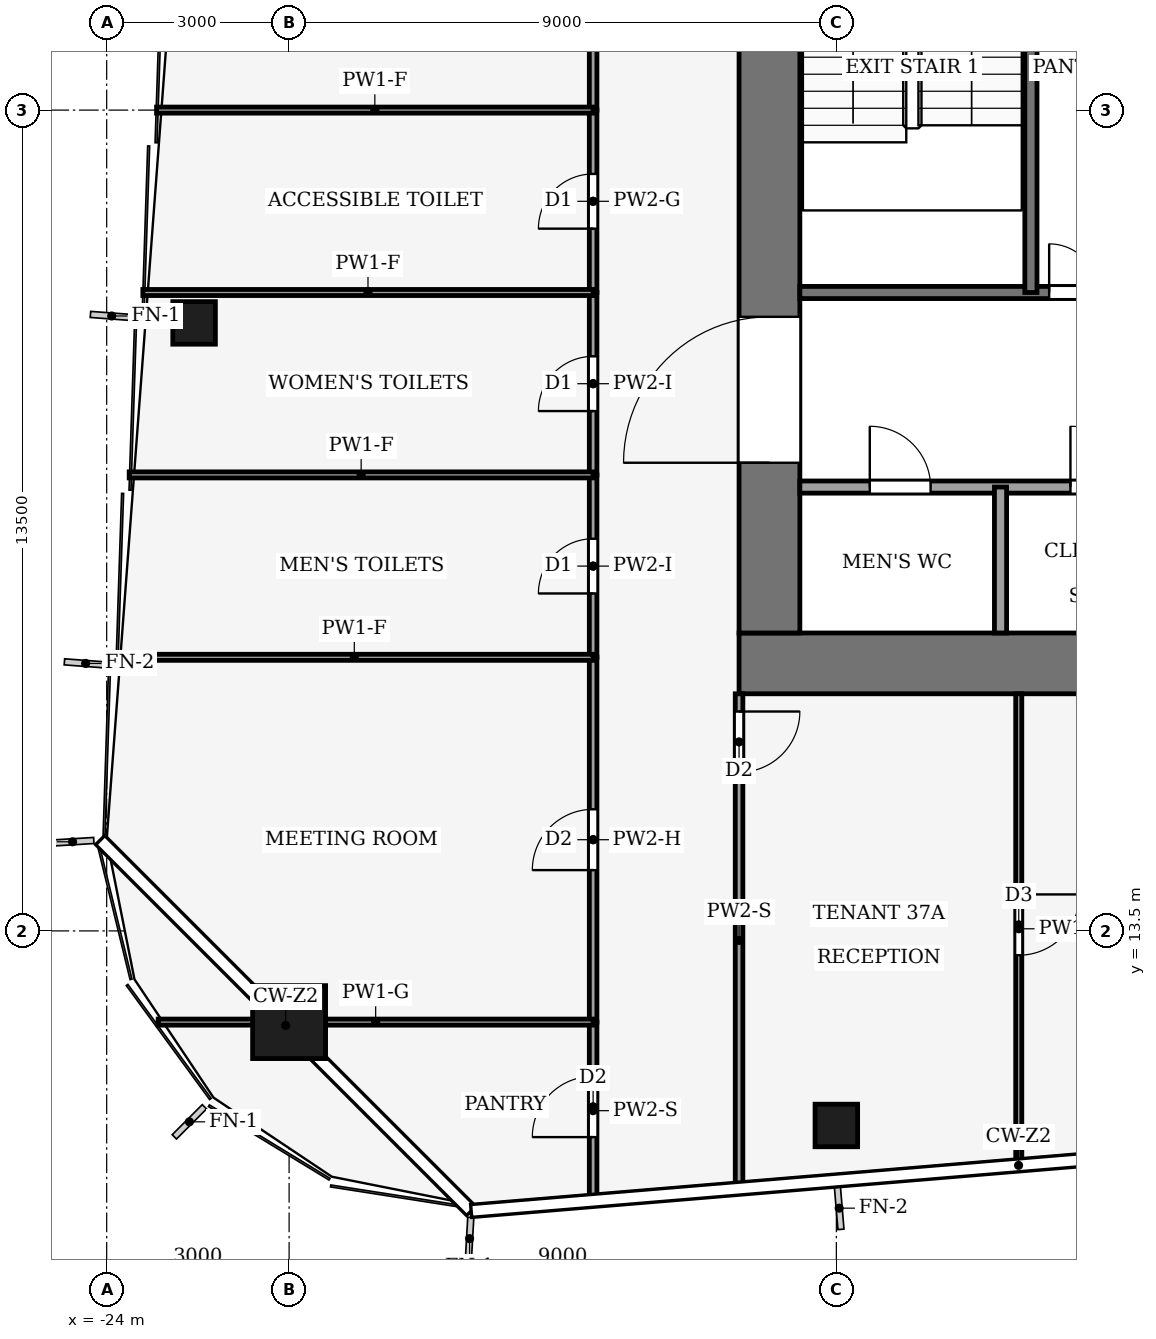
"""IFC4 building model, lengths in metres.
Left out: names, types, materials, properties, quantities, classifications, styles, units other than length and angle.
Written with IfcOpenShell. Run it as: python <this file> out.ifc"""

import sys

from ifc_helpers import new_model, si_unit, direction, frame, frame_2d, origin, origin_2d, place, context, subcontext, project, spatial, rectangle, hollow_rectangle, extrude, element, fill, save


model = new_model("IFC4")
c1 = context("Model", 3, precision=1e-05, world=origin(), true_north=direction((0.0, 1.0)))
c2 = subcontext(c1, "Body", "Model", "MODEL_VIEW")
j1 = project(units=[si_unit("LENGTHUNIT", "METRE"), si_unit("PLANEANGLEUNIT", "RADIAN")], contexts=[c1])
p1 = place(None, origin())
s1 = spatial("IfcSite", under=j1, at=p1, CompositionType="ELEMENT")
p2 = place(p1, origin())
s2 = spatial("IfcBuilding", under=s1, at=p2, CompositionType="ELEMENT")
p3 = place(p2, frame((0.0, 0.0, 162.0)))
s3 = spatial("IfcBuildingStorey", under=s2, at=p3, CompositionType="ELEMENT", Elevation=162.0)
p4 = place(p3, frame((-13.6, 17.9, -0.13), z_axis=(0.0, 0.0, 1.0), x_axis=(1.0, 0.0, 0.0)))
e1 = element("IfcWall", 1, at=p4, inside=s3, PredefinedType="SHEAR", context=c2, shape_type="SweptSolid", body=[
    extrude(rectangle(XDim=27.2, YDim=1.0, at=frame_2d((13.6, 0.0))), origin(), (0.0, 0.0, 1.0), 4.0),
])
p5 = place(p3, frame((-13.1, 18.4, -0.13), z_axis=(0.0, 0.0, 1.0), x_axis=(0.0, 1.0, 0.0)))
e2 = element("IfcWall", 2, at=p5, inside=s3, PredefinedType="SHEAR", context=c2, shape_type="SweptSolid", body=[
    extrude(rectangle(XDim=19.2, YDim=1.0, at=frame_2d((9.6, 0.0))), origin(), (0.0, 0.0, 1.0), 4.0),
])
p6 = place(p5, frame((2.8, 0.0, 0.13)))
e3 = element("IfcOpeningElement", 3, at=p6, cuts=e2, PredefinedType="OPENING", context=c2, shape_type="SweptSolid", body=[
    extrude(rectangle(XDim=2.4, YDim=2.4, at=frame_2d((1.2, 1.2))), frame((0.0, 0.51, 0.0), z_axis=(0.0, -1.0, 0.0), x_axis=(1.0, 0.0, 0.0)), (0.0, 0.0, 1.0), 1.02),
])
p7 = place(p5, frame((13.4, 0.0, 0.13)))
e4 = element("IfcOpeningElement", 4, at=p7, cuts=e2, PredefinedType="OPENING", context=c2, shape_type="SweptSolid", body=[
    extrude(rectangle(XDim=1.4, YDim=2.2, at=frame_2d((0.7, 1.1))), frame((0.0, 0.51, 0.0), z_axis=(0.0, -1.0, 0.0), x_axis=(1.0, 0.0, 0.0)), (0.0, 0.0, 1.0), 1.02),
])
p8 = place(p3, frame((-21.0, 12.0, 0.0), z_axis=(0.0, 0.0, 1.0), x_axis=(1.0, 0.0, 0.0)))
e5 = element("IfcColumn", 5, at=p8, inside=s3, PredefinedType="COLUMN", context=c2, shape_type="SweptSolid", body=[
    extrude(hollow_rectangle(XDim=1.2, YDim=1.2, WallThickness=0.07, at=origin_2d()), origin(), (0.0, 0.0, 1.0), 4.0),
])
for number, where, z_axis, x_axis in (
    (6, (-12.0, 10.3, 0.0), (0.0, 0.0, 1.0), (1.0, 0.0, 0.0)),
    (7, (-22.562, 23.5, 0.0), (0.0, 0.0, 1.0), (1.0, 0.0, 0.0)),
):
    element("IfcColumn", number, at=place(p3, frame(where, z_axis=z_axis, x_axis=x_axis)), inside=s3, PredefinedType="COLUMN", context=c2, shape_type="SweptSolid", body=[
        extrude(hollow_rectangle(XDim=0.7, YDim=0.7, WallThickness=0.03, at=origin_2d()), origin(), (0.0, 0.0, 1.0), 4.0),
    ])
p9 = place(p3, frame((-12.6, 20.8, 0.0), z_axis=(0.0, 0.0, 1.0), x_axis=(1.0, 0.0, 0.0)))
e8 = element("IfcWall", 8, at=p9, inside=s3, PredefinedType="PARTITIONING", context=c2, shape_type="SweptSolid", body=[
    extrude(rectangle(XDim=6.6, YDim=0.2, at=frame_2d((3.3, 0.0))), origin(), (0.0, 0.0, 1.0), 3.87),
])
p10 = place(p9, frame((1.15, 0.0, 0.0)))
e9 = element("IfcOpeningElement", 9, at=p10, cuts=e8, PredefinedType="OPENING", context=c2, shape_type="SweptSolid", body=[
    extrude(rectangle(XDim=1.0, YDim=2.1, at=frame_2d((0.5, 1.05))), frame((0.0, 0.11, 0.0), z_axis=(0.0, -1.0, 0.0), x_axis=(1.0, 0.0, 0.0)), (0.0, 0.0, 1.0), 0.22),
])
p11 = place(p9, frame((4.45, 0.0, 0.0)))
e10 = element("IfcOpeningElement", 10, at=p11, cuts=e8, PredefinedType="OPENING", context=c2, shape_type="SweptSolid", body=[
    extrude(rectangle(XDim=1.0, YDim=2.1, at=frame_2d((0.5, 1.05))), frame((0.0, 0.11, 0.0), z_axis=(0.0, -1.0, 0.0), x_axis=(1.0, 0.0, 0.0)), (0.0, 0.0, 1.0), 0.22),
])
p12 = place(p3, frame((-12.6, 24.0, 0.0), z_axis=(0.0, 0.0, 1.0), x_axis=(1.0, 0.0, 0.0)))
e11 = element("IfcWall", 11, at=p12, inside=s3, PredefinedType="PARTITIONING", context=c2, shape_type="SweptSolid", body=[
    extrude(rectangle(XDim=6.6, YDim=0.2, at=frame_2d((3.3, 0.0))), origin(), (0.0, 0.0, 1.0), 3.87),
])
p13 = place(p12, frame((4.1, 0.0, 0.0)))
e12 = element("IfcOpeningElement", 12, at=p13, cuts=e11, PredefinedType="OPENING", context=c2, shape_type="SweptSolid", body=[
    extrude(rectangle(XDim=0.8, YDim=2.1, at=frame_2d((0.4, 1.05))), frame((0.0, 0.11, 0.0), z_axis=(0.0, -1.0, 0.0), x_axis=(1.0, 0.0, 0.0)), (0.0, 0.0, 1.0), 0.22),
])
p14 = place(p12, frame((5.5, 0.0, 0.0)))
e13 = element("IfcOpeningElement", 13, at=p14, cuts=e11, PredefinedType="OPENING", context=c2, shape_type="SweptSolid", body=[
    extrude(rectangle(XDim=0.8, YDim=2.1, at=frame_2d((0.4, 1.05))), frame((0.0, 0.11, 0.0), z_axis=(0.0, -1.0, 0.0), x_axis=(1.0, 0.0, 0.0)), (0.0, 0.0, 1.0), 0.22),
])
p15 = place(p3, frame((-9.3, 18.4, 0.0), z_axis=(0.0, 0.0, 1.0), x_axis=(0.0, 1.0, 0.0)))
e14 = element("IfcWall", 14, at=p15, inside=s3, PredefinedType="PARTITIONING", context=c2, shape_type="SweptSolid", body=[
    extrude(rectangle(XDim=2.4, YDim=0.2, at=frame_2d((1.2, 0.0))), origin(), (0.0, 0.0, 1.0), 3.87),
])
p16 = place(p3, frame((-8.8, 24.0, 0.0), z_axis=(0.0, 0.0, 1.0), x_axis=(0.0, 1.0, 0.0)))
e15 = element("IfcWall", 15, at=p16, inside=s3, PredefinedType="PARTITIONING", context=c2, shape_type="SweptSolid", body=[
    extrude(rectangle(XDim=7.4, YDim=0.2, at=frame_2d((3.7, 0.0))), origin(), (0.0, 0.0, 1.0), 3.87),
])
p17 = place(p3, frame((-16.0, 9.087, 0.0), z_axis=(0.0, 0.0, 1.0), x_axis=(0.0, 1.0, 0.0)))
e16 = element("IfcWall", 16, at=p17, inside=s3, PredefinedType="PARTITIONING", context=c2, shape_type="SweptSolid", body=[
    extrude(rectangle(XDim=2.913, YDim=0.125, at=frame_2d((1.457, 0.0))), origin(), (0.0, 0.0, 1.0), 3.04),
])
p18 = place(p17, frame((1.022, 0.0, 0.0)))
e17 = element("IfcOpeningElement", 17, at=p18, cuts=e16, PredefinedType="OPENING", context=c2, shape_type="SweptSolid", body=[
    extrude(rectangle(XDim=1.0, YDim=2.1, at=frame_2d((0.5, 1.05))), frame((0.0, 0.073, 0.0), z_axis=(0.0, -1.0, 0.0), x_axis=(1.0, 0.0, 0.0)), (0.0, 0.0, 1.0), 0.145),
])
p19 = place(p3, frame((-16.0, 12.0, 0.0), z_axis=(0.0, 0.0, 1.0), x_axis=(0.0, 1.0, 0.0)))
e18 = element("IfcWall", 18, at=p19, inside=s3, PredefinedType="PARTITIONING", context=c2, shape_type="SweptSolid", body=[
    extrude(rectangle(XDim=6.0, YDim=0.125, at=frame_2d((3.0, 0.0))), origin(), (0.0, 0.0, 1.0), 3.14),
])
p20 = place(p19, frame((2.5, 0.0, 0.0)))
e19 = element("IfcOpeningElement", 19, at=p20, cuts=e18, PredefinedType="OPENING", context=c2, shape_type="SweptSolid", body=[
    extrude(rectangle(XDim=1.0, YDim=2.1, at=frame_2d((0.5, 1.05))), frame((0.0, 0.073, 0.0), z_axis=(0.0, -1.0, 0.0), x_axis=(1.0, 0.0, 0.0)), (0.0, 0.0, 1.0), 0.145),
])
p21 = place(p3, frame((-16.0, 18.0, 0.0), z_axis=(0.0, 0.0, 1.0), x_axis=(0.0, 1.0, 0.0)))
e20 = element("IfcWall", 20, at=p21, inside=s3, PredefinedType="PARTITIONING", context=c2, shape_type="SweptSolid", body=[
    extrude(rectangle(XDim=3.0, YDim=0.125, at=frame_2d((1.5, 0.0))), origin(), (0.0, 0.0, 1.0), 3.48),
])
p22 = place(p21, frame((1.05, 0.0, 0.0)))
e21 = element("IfcOpeningElement", 21, at=p22, cuts=e20, PredefinedType="OPENING", context=c2, shape_type="SweptSolid", body=[
    extrude(rectangle(XDim=0.9, YDim=2.1, at=frame_2d((0.45, 1.05))), frame((0.0, 0.073, 0.0), z_axis=(0.0, -1.0, 0.0), x_axis=(1.0, 0.0, 0.0)), (0.0, 0.0, 1.0), 0.145),
])
p23 = place(p3, frame((-16.0, 21.0, 0.0), z_axis=(0.0, 0.0, 1.0), x_axis=(0.0, 1.0, 0.0)))
e22 = element("IfcWall", 22, at=p23, inside=s3, PredefinedType="PARTITIONING", context=c2, shape_type="SweptSolid", body=[
    extrude(rectangle(XDim=3.0, YDim=0.125, at=frame_2d((1.5, 0.0))), origin(), (0.0, 0.0, 1.0), 3.48),
])
p24 = place(p23, frame((1.05, 0.0, 0.0)))
e23 = element("IfcOpeningElement", 23, at=p24, cuts=e22, PredefinedType="OPENING", context=c2, shape_type="SweptSolid", body=[
    extrude(rectangle(XDim=0.9, YDim=2.1, at=frame_2d((0.45, 1.05))), frame((0.0, 0.073, 0.0), z_axis=(0.0, -1.0, 0.0), x_axis=(1.0, 0.0, 0.0)), (0.0, 0.0, 1.0), 0.145),
])
p25 = place(p3, frame((-16.0, 24.0, 0.0), z_axis=(0.0, 0.0, 1.0), x_axis=(0.0, 1.0, 0.0)))
e24 = element("IfcWall", 24, at=p25, inside=s3, PredefinedType="PARTITIONING", context=c2, shape_type="SweptSolid", body=[
    extrude(rectangle(XDim=3.0, YDim=0.125, at=frame_2d((1.5, 0.0))), origin(), (0.0, 0.0, 1.0), 3.87),
])
p26 = place(p25, frame((1.05, 0.0, 0.0)))
e25 = element("IfcOpeningElement", 25, at=p26, cuts=e24, PredefinedType="OPENING", context=c2, shape_type="SweptSolid", body=[
    extrude(rectangle(XDim=0.9, YDim=2.1, at=frame_2d((0.45, 1.05))), frame((0.0, 0.073, 0.0), z_axis=(0.0, -1.0, 0.0), x_axis=(1.0, 0.0, 0.0)), (0.0, 0.0, 1.0), 0.145),
])
p27 = place(p3, frame((-16.0, 27.0, 0.0), z_axis=(0.0, 0.0, 1.0), x_axis=(0.0, 1.0, 0.0)))
e26 = element("IfcWall", 26, at=p27, inside=s3, PredefinedType="PARTITIONING", context=c2, shape_type="SweptSolid", body=[
    extrude(rectangle(XDim=9.0, YDim=0.125, at=frame_2d((4.5, 0.0))), origin(), (0.0, 0.0, 1.0), 3.48),
])
p28 = place(p27, frame((4.0, 0.0, 0.0)))
e27 = element("IfcOpeningElement", 27, at=p28, cuts=e26, PredefinedType="OPENING", context=c2, shape_type="SweptSolid", body=[
    extrude(rectangle(XDim=1.0, YDim=2.1, at=frame_2d((0.5, 1.05))), frame((0.0, 0.073, 0.0), z_axis=(0.0, -1.0, 0.0), x_axis=(1.0, 0.0, 0.0)), (0.0, 0.0, 1.0), 0.145),
])
p29 = place(p3, frame((-13.6, 17.4, 0.0), z_axis=(0.0, 0.0, 1.0), x_axis=(0.0, -1.0, 0.0)))
e28 = element("IfcWall", 28, at=p29, inside=s3, PredefinedType="PARTITIONING", context=c2, shape_type="SweptSolid", body=[
    extrude(rectangle(XDim=8.113, YDim=0.125, at=frame_2d((4.057, 0.0))), origin(), (0.0, 0.0, 1.0), 3.04),
])
p30 = place(p29, frame((0.292, 0.0, 0.0)))
e29 = element("IfcOpeningElement", 29, at=p30, cuts=e28, PredefinedType="OPENING", context=c2, shape_type="SweptSolid", body=[
    extrude(rectangle(XDim=1.0, YDim=2.1, at=frame_2d((0.5, 1.05))), frame((0.0, 0.073, 0.0), z_axis=(0.0, -1.0, 0.0), x_axis=(1.0, 0.0, 0.0)), (0.0, 0.0, 1.0), 0.145),
])
p31 = place(p3, frame((-16.0, 12.0, 0.0), z_axis=(0.0, 0.0, 1.0), x_axis=(-1.0, 0.0, 0.0)))
e30 = element("IfcWall", 30, at=p31, inside=s3, PredefinedType="PARTITIONING", context=c2, shape_type="SweptSolid", body=[
    extrude(rectangle(XDim=7.153, YDim=0.1, at=frame_2d((3.576, 0.0))), origin(), (0.0, 0.0, 1.0), 2.93),
])
p32 = place(p3, frame((-16.0, 18.0, 0.0), z_axis=(0.0, 0.0, 1.0), x_axis=(-1.0, 0.0, 0.0)))
e31 = element("IfcWall", 31, at=p32, inside=s3, PredefinedType="PARTITIONING", context=c2, shape_type="SweptSolid", body=[
    extrude(rectangle(XDim=7.855, YDim=0.1, at=frame_2d((3.927, 0.0))), origin(), (0.0, 0.0, 1.0), 3.04),
])
p33 = place(p3, frame((-16.0, 21.0, 0.0), z_axis=(0.0, 0.0, 1.0), x_axis=(-1.0, 0.0, 0.0)))
e32 = element("IfcWall", 32, at=p33, inside=s3, PredefinedType="PARTITIONING", context=c2, shape_type="SweptSolid", body=[
    extrude(rectangle(XDim=7.63, YDim=0.1, at=frame_2d((3.815, 0.0))), origin(), (0.0, 0.0, 1.0), 3.04),
])
p34 = place(p3, frame((-16.0, 24.0, 0.0), z_axis=(0.0, 0.0, 1.0), x_axis=(-1.0, 0.0, 0.0)))
e33 = element("IfcWall", 33, at=p34, inside=s3, PredefinedType="PARTITIONING", context=c2, shape_type="SweptSolid", body=[
    extrude(rectangle(XDim=7.405, YDim=0.1, at=frame_2d((3.703, 0.0))), origin(), (0.0, 0.0, 1.0), 3.04),
])
p35 = place(p3, frame((-16.0, 27.0, 0.0), z_axis=(0.0, 0.0, 1.0), x_axis=(-1.0, 0.0, 0.0)))
e34 = element("IfcWall", 34, at=p35, inside=s3, PredefinedType="PARTITIONING", context=c2, shape_type="SweptSolid", body=[
    extrude(rectangle(XDim=7.18, YDim=0.1, at=frame_2d((3.59, 0.0))), origin(), (0.0, 0.0, 1.0), 3.04),
])
p36 = place(p3, frame((-9.0, 17.4, 0.0), z_axis=(0.0, 0.0, 1.0), x_axis=(0.0, -1.0, 0.0)))
e35 = element("IfcWall", 35, at=p36, inside=s3, PredefinedType="PARTITIONING", context=c2, shape_type="SweptSolid", body=[
    extrude(rectangle(XDim=7.73, YDim=0.1, at=frame_2d((3.865, 0.0))), origin(), (0.0, 0.0, 1.0), 3.04),
])
p37 = place(p36, frame((3.3, 0.0, 0.0)))
e36 = element("IfcOpeningElement", 36, at=p37, cuts=e35, PredefinedType="OPENING", context=c2, shape_type="SweptSolid", body=[
    extrude(rectangle(XDim=1.0, YDim=2.1, at=frame_2d((0.5, 1.05))), frame((0.0, 0.06, 0.0), z_axis=(0.0, -1.0, 0.0), x_axis=(1.0, 0.0, 0.0)), (0.0, 0.0, 1.0), 0.12),
])
p38 = place(p10, origin())
e37 = element("IfcDoor", 37, at=p38, inside=s3, OperationType="SINGLE_SWING_LEFT", PredefinedType="DOOR", context=c2, shape_type="SweptSolid", body=[
    extrude(rectangle(XDim=1.0, YDim=2.1, at=frame_2d((0.5, 1.05))), frame((0.0, 0.025, 0.0), z_axis=(0.0, -1.0, 0.0), x_axis=(1.0, 0.0, 0.0)), (0.0, 0.0, 1.0), 0.05),
])
fill(e9, e37)
p39 = place(p11, origin())
e38 = element("IfcDoor", 38, at=p39, inside=s3, OperationType="SINGLE_SWING_LEFT", PredefinedType="DOOR", context=c2, shape_type="SweptSolid", body=[
    extrude(rectangle(XDim=1.0, YDim=2.1, at=frame_2d((0.5, 1.05))), frame((0.0, 0.025, 0.0), z_axis=(0.0, -1.0, 0.0), x_axis=(1.0, 0.0, 0.0)), (0.0, 0.0, 1.0), 0.05),
])
fill(e10, e38)
p40 = place(p13, origin())
e39 = element("IfcDoor", 39, at=p40, inside=s3, OperationType="SINGLE_SWING_LEFT", PredefinedType="DOOR", context=c2, shape_type="SweptSolid", body=[
    extrude(rectangle(XDim=0.8, YDim=2.1, at=frame_2d((0.4, 1.05))), frame((0.0, 0.025, 0.0), z_axis=(0.0, -1.0, 0.0), x_axis=(1.0, 0.0, 0.0)), (0.0, 0.0, 1.0), 0.05),
])
fill(e12, e39)
p41 = place(p6, origin())
e40 = element("IfcDoor", 40, at=p41, inside=s3, OperationType="DOUBLE_DOOR_SINGLE_SWING", PredefinedType="DOOR", context=c2, shape_type="SweptSolid", body=[
    extrude(rectangle(XDim=2.4, YDim=2.4, at=frame_2d((1.2, 1.2))), frame((0.0, 0.025, 0.0), z_axis=(0.0, -1.0, 0.0), x_axis=(1.0, 0.0, 0.0)), (0.0, 0.0, 1.0), 0.05),
])
fill(e3, e40)
p42 = place(p18, origin())
e41 = element("IfcDoor", 41, at=p42, inside=s3, OperationType="SINGLE_SWING_RIGHT", PredefinedType="DOOR", context=c2, shape_type="SweptSolid", body=[
    extrude(rectangle(XDim=1.0, YDim=2.1, at=frame_2d((0.5, 1.05))), frame((0.0, 0.025, 0.0), z_axis=(0.0, -1.0, 0.0), x_axis=(1.0, 0.0, 0.0)), (0.0, 0.0, 1.0), 0.05),
])
fill(e17, e41)
p43 = place(p20, origin())
e42 = element("IfcDoor", 42, at=p43, inside=s3, OperationType="SINGLE_SWING_RIGHT", PredefinedType="DOOR", context=c2, shape_type="SweptSolid", body=[
    extrude(rectangle(XDim=1.0, YDim=2.1, at=frame_2d((0.5, 1.05))), frame((0.0, 0.025, 0.0), z_axis=(0.0, -1.0, 0.0), x_axis=(1.0, 0.0, 0.0)), (0.0, 0.0, 1.0), 0.05),
])
fill(e19, e42)
p44 = place(p22, origin())
e43 = element("IfcDoor", 43, at=p44, inside=s3, OperationType="SINGLE_SWING_LEFT", PredefinedType="DOOR", context=c2, shape_type="SweptSolid", body=[
    extrude(rectangle(XDim=0.9, YDim=2.1, at=frame_2d((0.45, 1.05))), frame((0.0, 0.025, 0.0), z_axis=(0.0, -1.0, 0.0), x_axis=(1.0, 0.0, 0.0)), (0.0, 0.0, 1.0), 0.05),
])
fill(e21, e43)
p45 = place(p24, origin())
e44 = element("IfcDoor", 44, at=p45, inside=s3, OperationType="SINGLE_SWING_RIGHT", PredefinedType="DOOR", context=c2, shape_type="SweptSolid", body=[
    extrude(rectangle(XDim=0.9, YDim=2.1, at=frame_2d((0.45, 1.05))), frame((0.0, 0.025, 0.0), z_axis=(0.0, -1.0, 0.0), x_axis=(1.0, 0.0, 0.0)), (0.0, 0.0, 1.0), 0.05),
])
fill(e23, e44)
p46 = place(p26, origin())
e45 = element("IfcDoor", 45, at=p46, inside=s3, OperationType="SINGLE_SWING_LEFT", PredefinedType="DOOR", context=c2, shape_type="SweptSolid", body=[
    extrude(rectangle(XDim=0.9, YDim=2.1, at=frame_2d((0.45, 1.05))), frame((0.0, 0.025, 0.0), z_axis=(0.0, -1.0, 0.0), x_axis=(1.0, 0.0, 0.0)), (0.0, 0.0, 1.0), 0.05),
])
fill(e25, e45)
p47 = place(p30, origin())
e46 = element("IfcDoor", 46, at=p47, inside=s3, OperationType="SINGLE_SWING_LEFT", PredefinedType="DOOR", context=c2, shape_type="SweptSolid", body=[
    extrude(rectangle(XDim=1.0, YDim=2.1, at=frame_2d((0.5, 1.05))), frame((0.0, 0.025, 0.0), z_axis=(0.0, -1.0, 0.0), x_axis=(1.0, 0.0, 0.0)), (0.0, 0.0, 1.0), 0.05),
])
fill(e29, e46)
p48 = place(p37, origin())
e47 = element("IfcDoor", 47, at=p48, inside=s3, OperationType="SINGLE_SWING_LEFT", PredefinedType="DOOR", context=c2, shape_type="SweptSolid", body=[
    extrude(rectangle(XDim=1.0, YDim=2.1, at=frame_2d((0.5, 1.05))), frame((0.0, 0.025, 0.0), z_axis=(0.0, -1.0, 0.0), x_axis=(1.0, 0.0, 0.0)), (0.0, 0.0, 1.0), 0.05),
])
fill(e36, e47)
save(model, sys.argv[1])
